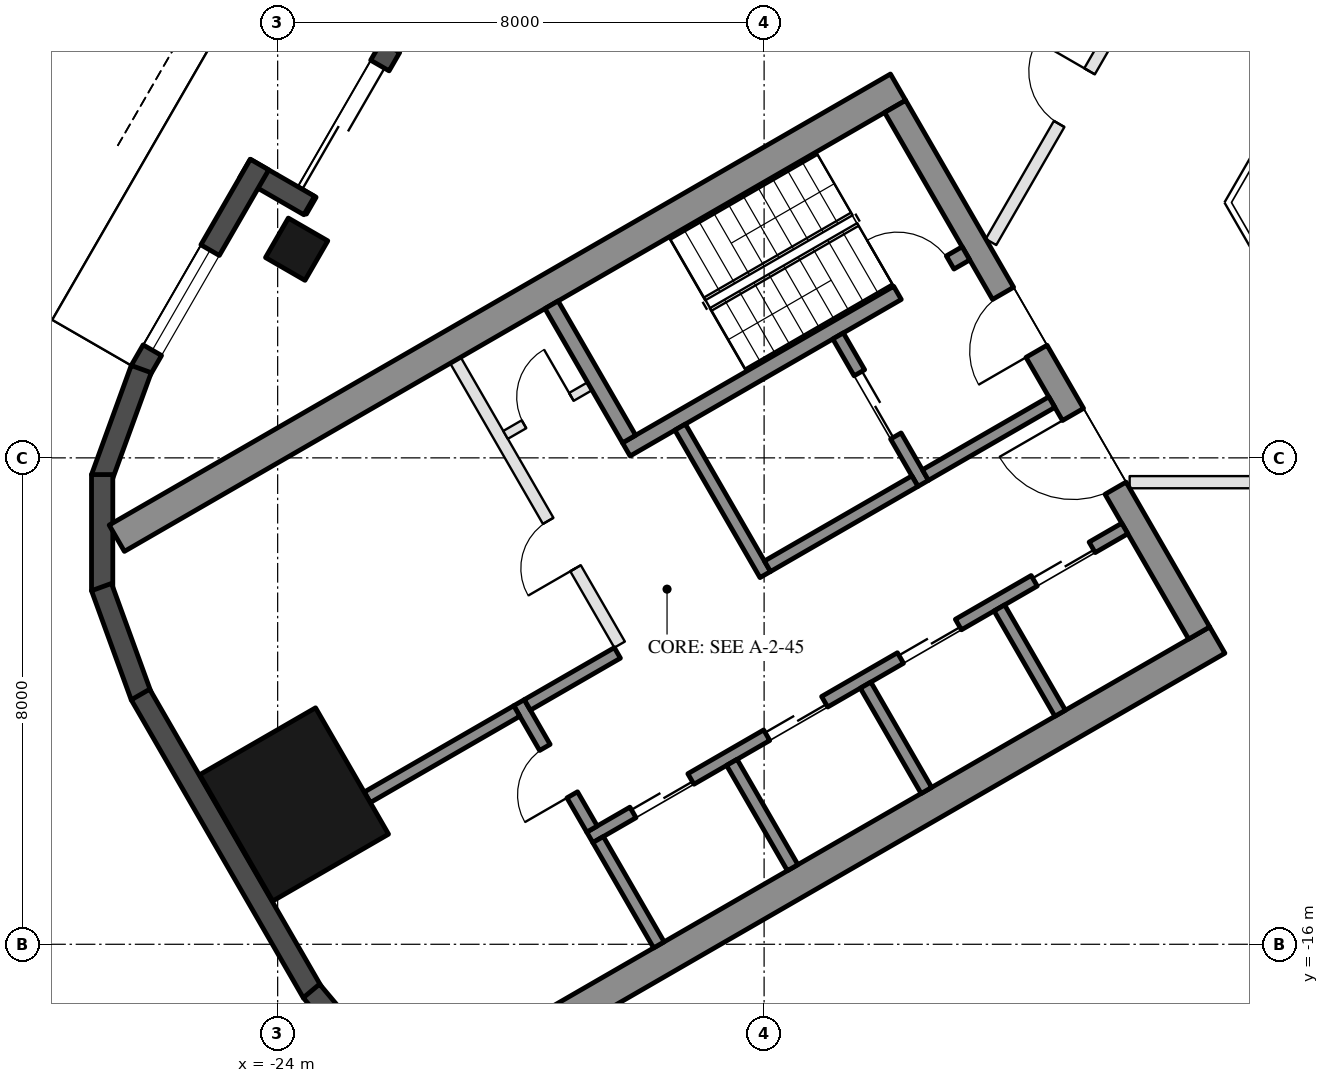
"""IFC4 building model, lengths in metres.
Left out: names, types, materials, properties, quantities, classifications, styles, units other than length and angle.
Written with IfcOpenShell. Run it as: python <this file> out.ifc"""

import sys

from ifc_helpers import new_model, si_unit, direction, frame, frame_2d, origin, origin_2d, place, context, subcontext, project, spatial, rectangle, hollow_rectangle, extrude, element, fill, save


model = new_model("IFC4")
c1 = context("Model", 3, precision=1e-05, world=origin(), true_north=direction((0.0, 1.0)))
c2 = subcontext(c1, "Body", "Model", "MODEL_VIEW")
j1 = project(units=[si_unit("LENGTHUNIT", "METRE"), si_unit("PLANEANGLEUNIT", "RADIAN")], contexts=[c1])
p1 = place(None, origin())
s1 = spatial("IfcSite", under=j1, at=p1, CompositionType="ELEMENT")
p2 = place(p1, origin())
s2 = spatial("IfcBuilding", under=s1, at=p2, CompositionType="ELEMENT")
p3 = place(p2, frame((0.0, 0.0, 198.4)))
s3 = spatial("IfcBuildingStorey", under=s2, at=p3, CompositionType="ELEMENT", Elevation=198.4)
p4 = place(p3, frame((-23.688, -4.568, 0.0), z_axis=(0.0, 0.0, 1.0), x_axis=(0.5, 0.866025403784, 0.0)))
e1 = element("IfcColumn", 1, at=p4, inside=s3, PredefinedType="COLUMN", context=c2, shape_type="SweptSolid", body=[
    extrude(hollow_rectangle(XDim=0.75, YDim=0.75, WallThickness=0.035, at=origin_2d()), origin(), (0.0, 0.0, 1.0), 3.7),
])
p5 = place(p3, frame((-23.729, -13.7, 0.0), z_axis=(0.0, 0.0, 1.0), x_axis=(-0.5, 0.866025403784, 0.0)))
e2 = element("IfcColumn", 2, at=p5, inside=s3, PredefinedType="COLUMN", context=c2, shape_type="SweptSolid", body=[
    extrude(hollow_rectangle(XDim=2.4, YDim=2.2, WallThickness=0.06, at=origin_2d()), origin(), (0.0, 0.0, 1.0), 3.7),
])
p6 = place(p3, frame((-20.309, 1.934, 0.0), z_axis=(0.0, 0.0, 1.0), x_axis=(-0.499992114976, -0.866029956157, 0.0)))
e3 = element("IfcWall", 3, at=p6, inside=s3, PredefinedType="SOLIDWALL", context=c2, shape_type="SweptSolid", body=[
    extrude(rectangle(XDim=6.74, YDim=0.35, at=frame_2d((3.37, 0.0))), origin(), (0.0, 0.0, 1.0), 3.55),
])
p7 = place(p6, frame((4.02, 0.0, 0.0)))
e4 = element("IfcOpeningElement", 4, at=p7, cuts=e3, PredefinedType="OPENING", context=c2, shape_type="SweptSolid", body=[
    extrude(rectangle(XDim=2.4, YDim=2.4, at=frame_2d((1.2, 1.2))), frame((0.0, 0.185, 0.0), z_axis=(0.0, -1.0, 0.0), x_axis=(1.0, 0.0, 0.0)), (0.0, 0.0, 1.0), 0.37),
])
p8 = place(p6, frame((0.77, 0.0, 0.3)))
e5 = element("IfcOpeningElement", 5, at=p8, cuts=e3, PredefinedType="OPENING", context=c2, shape_type="SweptSolid", body=[
    extrude(rectangle(XDim=2.9, YDim=2.65, at=frame_2d((1.45, 1.325))), frame((0.0, 0.185, 0.0), z_axis=(0.0, -1.0, 0.0), x_axis=(1.0, 0.0, 0.0)), (0.0, 0.0, 1.0), 0.37),
])
p9 = place(p3, frame((-23.481, -3.85, 0.0), z_axis=(0.0, 0.0, 1.0), x_axis=(-0.866092288191, 0.499884134912, 0.0)))
e6 = element("IfcWall", 6, at=p9, inside=s3, PredefinedType="SOLIDWALL", context=c2, shape_type="SweptSolid", body=[
    extrude(rectangle(XDim=1.22, YDim=0.35, at=frame_2d((0.61, 0.0))), origin(), (0.0, 0.0, 1.0), 3.55),
])
p10 = place(p3, frame((-24.299, -3.176, 0.0), z_axis=(0.0, 0.0, 1.0), x_axis=(-0.500028278809, -0.866009076391, 0.0)))
e7 = element("IfcWall", 7, at=p10, inside=s3, PredefinedType="SOLIDWALL", context=c2, shape_type="SweptSolid", body=[
    extrude(rectangle(XDim=3.916, YDim=0.35, at=frame_2d((1.958, 0.0))), origin(), (0.0, 0.0, 1.0), 3.55),
])
p11 = place(p10, frame((1.625, 0.0, 0.3)))
e8 = element("IfcOpeningElement", 8, at=p11, cuts=e7, PredefinedType="OPENING", context=c2, shape_type="SweptSolid", body=[
    extrude(rectangle(XDim=1.9, YDim=2.65, at=frame_2d((0.95, 1.325))), frame((0.0, 0.185, 0.0), z_axis=(0.0, -1.0, 0.0), x_axis=(1.0, 0.0, 0.0)), (0.0, 0.0, 1.0), 0.37),
])
for number, where, z_axis, x_axis in (
    (9, (-26.244, -6.54, 0.0), (0.0, 0.0, 1.0), (-0.342, -0.94, 0.0)),
    (10, (-26.886, -8.275, 0.0), (0.0, 0.0, 1.0), (0.0, -1.0, 0.0)),
    (11, (-26.897, -10.125, 0.0), (0.0, 0.0, 1.0), (0.342, -0.94, 0.0)),
):
    element("IfcWall", number, at=place(p3, frame(where, z_axis=z_axis, x_axis=x_axis)), inside=s3, PredefinedType="SOLIDWALL", context=c2, shape_type="SweptSolid", body=[
        extrude(rectangle(XDim=1.91, YDim=0.35, at=frame_2d((0.955, 0.0))), origin(), (0.0, 0.0, 1.0), 3.55),
    ])
p12 = place(p3, frame((-26.257, -11.893, 0.0), z_axis=(0.0, 0.0, 1.0), x_axis=(0.500018773155, -0.866014564827, 0.0)))
e12 = element("IfcWall", 12, at=p12, inside=s3, PredefinedType="SOLIDWALL", context=c2, shape_type="SweptSolid", body=[
    extrude(rectangle(XDim=5.658, YDim=0.35, at=frame_2d((2.829, 0.0))), origin(), (0.0, 0.0, 1.0), 3.55),
])
p13 = place(p3, frame((-23.445, -16.768, 0.0), z_axis=(0.0, 0.0, 1.0), x_axis=(0.642733291068, -0.76609001857, 0.0)))
e13 = element("IfcWall", 13, at=p13, inside=s3, PredefinedType="SOLIDWALL", context=c2, shape_type="SweptSolid", body=[
    extrude(rectangle(XDim=1.91, YDim=0.35, at=frame_2d((0.955, 0.0))), origin(), (0.0, 0.0, 1.0), 3.55),
])
for number, where, z_axis, x_axis in (
    (14, (-13.797, -1.903, 0.0), (0.0, 0.0, 1.0), (-0.866, -0.5, 0.0)),
    (15, (-8.547, -10.997, 0.0), (0.0, 0.0, 1.0), (-0.866, -0.5, 0.0)),
):
    element("IfcWall", number, at=place(p3, frame(where, z_axis=z_axis, x_axis=x_axis)), inside=s3, PredefinedType="SHEAR", context=c2, shape_type="SweptSolid", body=[
        extrude(rectangle(XDim=14.837, YDim=0.5, at=frame_2d((7.418, 0.0))), origin(), (0.0, 0.0, 1.0), 3.5),
    ])
p14 = place(p3, frame((-13.845, -2.22, 0.0), z_axis=(0.0, 0.0, 1.0), x_axis=(0.500004234368, -0.866022959057, 0.0)))
e16 = element("IfcWall", 16, at=p14, inside=s3, PredefinedType="SHEAR", context=c2, shape_type="SweptSolid", body=[
    extrude(rectangle(XDim=10.0, YDim=0.4, at=frame_2d((5.0, 0.0))), origin(), (0.0, 0.0, 1.0), 3.5),
])
p15 = place(p14, frame((3.55, 0.0, 0.0)))
e17 = element("IfcOpeningElement", 17, at=p15, cuts=e16, PredefinedType="OPENING", context=c2, shape_type="SweptSolid", body=[
    extrude(rectangle(XDim=1.1, YDim=2.1, at=frame_2d((0.55, 1.05))), frame((0.0, 0.21, 0.0), z_axis=(0.0, -1.0, 0.0), x_axis=(1.0, 0.0, 0.0)), (0.0, 0.0, 1.0), 0.42),
])
p16 = place(p14, frame((5.85, 0.0, 0.0)))
e18 = element("IfcOpeningElement", 18, at=p16, cuts=e16, PredefinedType="OPENING", context=c2, shape_type="SweptSolid", body=[
    extrude(rectangle(XDim=1.4, YDim=2.1, at=frame_2d((0.7, 1.05))), frame((0.0, 0.21, 0.0), z_axis=(0.0, -1.0, 0.0), x_axis=(1.0, 0.0, 0.0)), (0.0, 0.0, 1.0), 0.42),
])
p17 = place(p3, frame((-12.681, -4.636, 0.0), z_axis=(0.0, 0.0, 1.0), x_axis=(-0.866021702275, -0.500006411147, 0.0)))
e19 = element("IfcWall", 19, at=p17, inside=s3, PredefinedType="SHEAR", context=c2, shape_type="SweptSolid", body=[
    extrude(rectangle(XDim=6.45, YDim=0.25, at=frame_2d((3.225, 0.0))), origin(), (0.0, 0.0, 1.0), 3.5),
])
p18 = place(p17, frame((0.3, 0.0, 0.0)))
e20 = element("IfcOpeningElement", 20, at=p18, cuts=e19, PredefinedType="OPENING", context=c2, shape_type="SweptSolid", body=[
    extrude(rectangle(XDim=1.0, YDim=2.1, at=frame_2d((0.5, 1.05))), frame((0.0, 0.135, 0.0), z_axis=(0.0, -1.0, 0.0), x_axis=(1.0, 0.0, 0.0)), (0.0, 0.0, 1.0), 0.27),
])
p19 = place(p3, frame((-19.496, -5.482, 0.0), z_axis=(0.0, 0.0, 1.0), x_axis=(0.499990435942, -0.866030925526, 0.0)))
e21 = element("IfcWall", 21, at=p19, inside=s3, PredefinedType="SHEAR", context=c2, shape_type="SweptSolid", body=[
    extrude(rectangle(XDim=2.55, YDim=0.25, at=frame_2d((1.275, 0.0))), origin(), (0.0, 0.0, 1.0), 3.5),
])
p20 = place(p3, frame((-17.381, -7.495, 0.0), z_axis=(0.0, 0.0, 1.0), x_axis=(0.500011755427, -0.866018616679, 0.0)))
e22 = element("IfcWall", 22, at=p20, inside=s3, PredefinedType="SHEAR", context=c2, shape_type="SweptSolid", body=[
    extrude(rectangle(XDim=2.8, YDim=0.2, at=frame_2d((1.4, 0.0))), origin(), (0.0, 0.0, 1.0), 3.5),
])
p21 = place(p3, frame((-14.783, -5.995, 0.0), z_axis=(0.0, 0.0, 1.0), x_axis=(0.49994636267, -0.866056369097, 0.0)))
e23 = element("IfcWall", 23, at=p21, inside=s3, PredefinedType="SHEAR", context=c2, shape_type="SweptSolid", body=[
    extrude(rectangle(XDim=2.8, YDim=0.2, at=frame_2d((1.4, 0.0))), origin(), (0.0, 0.0, 1.0), 3.5),
])
p22 = place(p21, frame((0.7, 0.0, 0.0)))
e24 = element("IfcOpeningElement", 24, at=p22, cuts=e23, PredefinedType="OPENING", context=c2, shape_type="SweptSolid", body=[
    extrude(rectangle(XDim=1.2, YDim=2.1, at=frame_2d((0.6, 1.05))), frame((0.0, 0.11, 0.0), z_axis=(0.0, -1.0, 0.0), x_axis=(1.0, 0.0, 0.0)), (0.0, 0.0, 1.0), 0.22),
])
p23 = place(p3, frame((-13.52, -8.383, 0.0), z_axis=(0.0, 0.0, 1.0), x_axis=(-0.866034573852, -0.49998411664, 0.0)))
e25 = element("IfcWall", 25, at=p23, inside=s3, PredefinedType="SHEAR", context=c2, shape_type="SweptSolid", body=[
    extrude(rectangle(XDim=2.8, YDim=0.2, at=frame_2d((1.4, 0.0))), origin(), (0.0, 0.0, 1.0), 3.5),
])
p24 = place(p3, frame((-11.268, -7.083, 0.0), z_axis=(0.0, 0.0, 1.0), x_axis=(-0.866050077142, -0.499957262057, 0.0)))
e26 = element("IfcWall", 26, at=p24, inside=s3, PredefinedType="SHEAR", context=c2, shape_type="SweptSolid", body=[
    extrude(rectangle(XDim=2.4, YDim=0.2, at=frame_2d((1.2, 0.0))), origin(), (0.0, 0.0, 1.0), 3.5),
])
p25 = place(p3, frame((-10.068, -9.162, 0.0), z_axis=(0.0, 0.0, 1.0), x_axis=(-0.866032725843, -0.499987317609, 0.0)))
e27 = element("IfcWall", 27, at=p25, inside=s3, PredefinedType="SHEAR", context=c2, shape_type="SweptSolid", body=[
    extrude(rectangle(XDim=10.16, YDim=0.2, at=frame_2d((5.08, 0.0))), origin(), (0.0, 0.0, 1.0), 3.5),
])
p26 = place(p25, frame((0.62, 0.0, 0.0)))
e28 = element("IfcOpeningElement", 28, at=p26, cuts=e27, PredefinedType="OPENING", context=c2, shape_type="SweptSolid", body=[
    extrude(rectangle(XDim=1.1, YDim=2.1, at=frame_2d((0.55, 1.05))), frame((0.0, 0.11, 0.0), z_axis=(0.0, -1.0, 0.0), x_axis=(1.0, 0.0, 0.0)), (0.0, 0.0, 1.0), 0.22),
])
p27 = place(p25, frame((3.16, 0.0, 0.0)))
e29 = element("IfcOpeningElement", 29, at=p27, cuts=e27, PredefinedType="OPENING", context=c2, shape_type="SweptSolid", body=[
    extrude(rectangle(XDim=1.1, YDim=2.1, at=frame_2d((0.55, 1.05))), frame((0.0, 0.11, 0.0), z_axis=(0.0, -1.0, 0.0), x_axis=(1.0, 0.0, 0.0)), (0.0, 0.0, 1.0), 0.22),
])
p28 = place(p25, frame((5.7, 0.0, 0.0)))
e30 = element("IfcOpeningElement", 30, at=p28, cuts=e27, PredefinedType="OPENING", context=c2, shape_type="SweptSolid", body=[
    extrude(rectangle(XDim=1.1, YDim=2.1, at=frame_2d((0.55, 1.05))), frame((0.0, 0.11, 0.0), z_axis=(0.0, -1.0, 0.0), x_axis=(1.0, 0.0, 0.0)), (0.0, 0.0, 1.0), 0.22),
])
p29 = place(p25, frame((8.24, 0.0, 0.0)))
e31 = element("IfcOpeningElement", 31, at=p29, cuts=e27, PredefinedType="OPENING", context=c2, shape_type="SweptSolid", body=[
    extrude(rectangle(XDim=1.1, YDim=2.1, at=frame_2d((0.55, 1.05))), frame((0.0, 0.11, 0.0), z_axis=(0.0, -1.0, 0.0), x_axis=(1.0, 0.0, 0.0)), (0.0, 0.0, 1.0), 0.22),
])
p30 = place(p3, frame((-20.031, -12.026, 0.0), z_axis=(0.0, 0.0, 1.0), x_axis=(0.500033551112, -0.866006032174, 0.0)))
e32 = element("IfcWall", 32, at=p30, inside=s3, PredefinedType="SHEAR", context=c2, shape_type="SweptSolid", body=[
    extrude(rectangle(XDim=2.4, YDim=0.2, at=frame_2d((1.2, 0.0))), origin(), (0.0, 0.0, 1.0), 3.5),
])
p31 = place(p30, frame((0.85, 0.0, 0.0)))
e33 = element("IfcOpeningElement", 33, at=p31, cuts=e32, PredefinedType="OPENING", context=c2, shape_type="SweptSolid", body=[
    extrude(rectangle(XDim=0.9, YDim=2.1, at=frame_2d((0.45, 1.05))), frame((0.0, 0.11, 0.0), z_axis=(0.0, -1.0, 0.0), x_axis=(1.0, 0.0, 0.0)), (0.0, 0.0, 1.0), 0.22),
])
p32 = place(p3, frame((-18.413, -11.208, 0.0), z_axis=(0.0, 0.0, 1.0), x_axis=(-0.866038183914, -0.499977863513, 0.0)))
e34 = element("IfcWall", 34, at=p32, inside=s3, PredefinedType="SHEAR", context=c2, shape_type="SweptSolid", body=[
    extrude(rectangle(XDim=1.71, YDim=0.2, at=frame_2d((0.855, 0.0))), origin(), (0.0, 0.0, 1.0), 3.5),
])
for number, where, z_axis, x_axis in (
    (35, (-12.131, -10.468, 0.0), (0.0, 0.0, 1.0), (0.5, -0.866, 0.0)),
    (36, (-14.331, -11.738, 0.0), (0.0, 0.0, 1.0), (0.5, -0.866, 0.0)),
    (37, (-16.531, -13.008, 0.0), (0.0, 0.0, 1.0), (0.5, -0.866, 0.0)),
    (38, (-18.73, -14.278, 0.0), (0.0, 0.0, 1.0), (0.5, -0.866, 0.0)),
):
    element("IfcWall", number, at=place(p3, frame(where, z_axis=z_axis, x_axis=x_axis)), inside=s3, PredefinedType="SHEAR", context=c2, shape_type="SweptSolid", body=[
        extrude(rectangle(XDim=2.0, YDim=0.2, at=frame_2d((1.0, 0.0))), origin(), (0.0, 0.0, 1.0), 3.5),
    ])
p33 = place(p3, frame((-20.067, -12.163, 0.0), z_axis=(0.0, 0.0, 1.0), x_axis=(-0.866055327414, -0.49994816717, 0.0)))
e39 = element("IfcWall", 39, at=p33, inside=s3, PredefinedType="SHEAR", context=c2, shape_type="SweptSolid", body=[
    extrude(rectangle(XDim=2.84, YDim=0.2, at=frame_2d((1.42, 0.0))), origin(), (0.0, 0.0, 1.0), 3.5),
])
p34 = place(p3, frame((-21.076, -6.395, 0.0), z_axis=(0.0, 0.0, 1.0), x_axis=(0.50001468107, -0.866016927499, 0.0)))
e40 = element("IfcWall", 40, at=p34, inside=s3, PredefinedType="PARTITIONING", context=c2, shape_type="SweptSolid", body=[
    extrude(rectangle(XDim=5.4, YDim=0.2, at=frame_2d((2.7, 0.0))), origin(), (0.0, 0.0, 1.0), 3.5),
])
p35 = place(p34, frame((3.05, 0.0, 0.0)))
e41 = element("IfcOpeningElement", 41, at=p35, cuts=e40, PredefinedType="OPENING", context=c2, shape_type="SweptSolid", body=[
    extrude(rectangle(XDim=0.9, YDim=2.1, at=frame_2d((0.45, 1.05))), frame((0.0, 0.11, 0.0), z_axis=(0.0, -1.0, 0.0), x_axis=(1.0, 0.0, 0.0)), (0.0, 0.0, 1.0), 0.22),
])
p36 = place(p3, frame((-18.866, -6.822, 0.0), z_axis=(0.0, 0.0, 1.0), x_axis=(-0.866028054938, -0.499995408039, 0.0)))
e42 = element("IfcWall", 42, at=p36, inside=s3, PredefinedType="PARTITIONING", context=c2, shape_type="SweptSolid", body=[
    extrude(rectangle(XDim=1.6, YDim=0.15, at=frame_2d((0.8, 0.0))), origin(), (0.0, 0.0, 1.0), 3.5),
])
p37 = place(p36, frame((0.35, 0.0, 0.0)))
e43 = element("IfcOpeningElement", 43, at=p37, cuts=e42, PredefinedType="OPENING", context=c2, shape_type="SweptSolid", body=[
    extrude(rectangle(XDim=0.9, YDim=2.1, at=frame_2d((0.45, 1.05))), frame((0.0, 0.085, 0.0), z_axis=(0.0, -1.0, 0.0), x_axis=(1.0, 0.0, 0.0)), (0.0, 0.0, 1.0), 0.17),
])
p38 = place(p3, frame((-1.302, -8.4, 0.0), z_axis=(0.0, 0.0, 1.0), x_axis=(-1.0, 0.0, 0.0)))
e44 = element("IfcWall", 44, at=p38, inside=s3, PredefinedType="PARTITIONING", context=c2, shape_type="SweptSolid", body=[
    extrude(rectangle(XDim=8.686, YDim=0.2, at=frame_2d((4.343, 0.0))), origin(), (0.0, 0.0, 1.0), 2.95),
])
p39 = place(p38, frame((3.843, 0.0, 0.0)))
e45 = element("IfcOpeningElement", 45, at=p39, cuts=e44, PredefinedType="OPENING", context=c2, shape_type="SweptSolid", body=[
    extrude(rectangle(XDim=1.0, YDim=2.1, at=frame_2d((0.5, 1.05))), frame((0.0, 0.11, 0.0), z_axis=(0.0, -1.0, 0.0), x_axis=(1.0, 0.0, 0.0)), (0.0, 0.0, 1.0), 0.22),
])
p40 = place(p3, frame((-12.269, -4.45, 0.0), z_axis=(0.0, 0.0, 1.0), x_axis=(0.500026884667, 0.866009881359, 0.0)))
e46 = element("IfcWall", 46, at=p40, inside=s3, PredefinedType="PARTITIONING", context=c2, shape_type="SweptSolid", body=[
    extrude(rectangle(XDim=5.484, YDim=0.2, at=frame_2d((2.742, 0.0))), origin(), (0.0, 0.0, 1.0), 2.95),
])
p41 = place(p40, frame((2.242, 0.0, 0.0)))
e47 = element("IfcOpeningElement", 47, at=p41, cuts=e46, PredefinedType="OPENING", context=c2, shape_type="SweptSolid", body=[
    extrude(rectangle(XDim=1.0, YDim=2.1, at=frame_2d((0.5, 1.05))), frame((0.0, 0.11, 0.0), z_axis=(0.0, -1.0, 0.0), x_axis=(1.0, 0.0, 0.0)), (0.0, 0.0, 1.0), 0.22),
])
p42 = place(p7, frame((2.4, 0.0, 0.0), z_axis=(0.0, 0.0, 1.0), x_axis=(-1.0, 0.0, 0.0)))
e48 = element("IfcDoor", 48, at=p42, inside=s3, OperationType="SLIDING_TO_LEFT", PredefinedType="DOOR", context=c2, shape_type="SweptSolid", body=[
    extrude(rectangle(XDim=2.4, YDim=2.4, at=frame_2d((1.2, 1.2))), frame((0.0, 0.025, 0.0), z_axis=(0.0, -1.0, 0.0), x_axis=(1.0, 0.0, 0.0)), (0.0, 0.0, 1.0), 0.05),
])
fill(e4, e48)
p43 = place(p11, origin())
e49 = element("IfcWindow", 49, at=p43, inside=s3, PartitioningType="SINGLE_PANEL", PredefinedType="WINDOW", context=c2, shape_type="SweptSolid", body=[
    extrude(rectangle(XDim=1.9, YDim=2.65, at=frame_2d((0.95, 1.325))), frame((0.0, 0.03, 0.0), z_axis=(0.0, -1.0, 0.0), x_axis=(1.0, 0.0, 0.0)), (0.0, 0.0, 1.0), 0.06),
])
fill(e8, e49)
p44 = place(p22, origin())
e50 = element("IfcDoor", 50, at=p44, inside=s3, OperationType="DOUBLE_DOOR_SLIDING", PredefinedType="DOOR", context=c2, shape_type="SweptSolid", body=[
    extrude(rectangle(XDim=1.2, YDim=2.1, at=frame_2d((0.6, 1.05))), frame((0.0, 0.025, 0.0), z_axis=(0.0, -1.0, 0.0), x_axis=(1.0, 0.0, 0.0)), (0.0, 0.0, 1.0), 0.05),
])
fill(e24, e50)
p45 = place(p37, frame((0.9, 0.0, 0.0), z_axis=(0.0, 0.0, 1.0), x_axis=(-1.0, 0.0, 0.0)))
e51 = element("IfcDoor", 51, at=p45, inside=s3, OperationType="SINGLE_SWING_RIGHT", PredefinedType="DOOR", context=c2, shape_type="SweptSolid", body=[
    extrude(rectangle(XDim=0.9, YDim=2.1, at=frame_2d((0.45, 1.05))), frame((0.0, 0.025, 0.0), z_axis=(0.0, -1.0, 0.0), x_axis=(1.0, 0.0, 0.0)), (0.0, 0.0, 1.0), 0.05),
])
fill(e43, e51)
p46 = place(p26, origin())
e52 = element("IfcDoor", 52, at=p46, inside=s3, OperationType="DOUBLE_DOOR_SLIDING", PredefinedType="DOOR", context=c2, shape_type="SweptSolid", body=[
    extrude(rectangle(XDim=1.1, YDim=2.1, at=frame_2d((0.55, 1.05))), frame((0.0, 0.025, 0.0), z_axis=(0.0, -1.0, 0.0), x_axis=(1.0, 0.0, 0.0)), (0.0, 0.0, 1.0), 0.05),
])
fill(e28, e52)
p47 = place(p27, origin())
e53 = element("IfcDoor", 53, at=p47, inside=s3, OperationType="DOUBLE_DOOR_SLIDING", PredefinedType="DOOR", context=c2, shape_type="SweptSolid", body=[
    extrude(rectangle(XDim=1.1, YDim=2.1, at=frame_2d((0.55, 1.05))), frame((0.0, 0.025, 0.0), z_axis=(0.0, -1.0, 0.0), x_axis=(1.0, 0.0, 0.0)), (0.0, 0.0, 1.0), 0.05),
])
fill(e29, e53)
p48 = place(p28, origin())
e54 = element("IfcDoor", 54, at=p48, inside=s3, OperationType="DOUBLE_DOOR_SLIDING", PredefinedType="DOOR", context=c2, shape_type="SweptSolid", body=[
    extrude(rectangle(XDim=1.1, YDim=2.1, at=frame_2d((0.55, 1.05))), frame((0.0, 0.025, 0.0), z_axis=(0.0, -1.0, 0.0), x_axis=(1.0, 0.0, 0.0)), (0.0, 0.0, 1.0), 0.05),
])
fill(e30, e54)
p49 = place(p29, origin())
e55 = element("IfcDoor", 55, at=p49, inside=s3, OperationType="DOUBLE_DOOR_SLIDING", PredefinedType="DOOR", context=c2, shape_type="SweptSolid", body=[
    extrude(rectangle(XDim=1.1, YDim=2.1, at=frame_2d((0.55, 1.05))), frame((0.0, 0.025, 0.0), z_axis=(0.0, -1.0, 0.0), x_axis=(1.0, 0.0, 0.0)), (0.0, 0.0, 1.0), 0.05),
])
fill(e31, e55)
p50 = place(p31, frame((0.9, 0.0, 0.0), z_axis=(0.0, 0.0, 1.0), x_axis=(-1.0, 0.0, 0.0)))
e56 = element("IfcDoor", 56, at=p50, inside=s3, OperationType="SINGLE_SWING_LEFT", PredefinedType="DOOR", context=c2, shape_type="SweptSolid", body=[
    extrude(rectangle(XDim=0.9, YDim=2.1, at=frame_2d((0.45, 1.05))), frame((0.0, 0.025, 0.0), z_axis=(0.0, -1.0, 0.0), x_axis=(1.0, 0.0, 0.0)), (0.0, 0.0, 1.0), 0.05),
])
fill(e33, e56)
p51 = place(p35, frame((0.9, 0.0, 0.0), z_axis=(0.0, 0.0, 1.0), x_axis=(-1.0, 0.0, 0.0)))
e57 = element("IfcDoor", 57, at=p51, inside=s3, OperationType="SINGLE_SWING_LEFT", PredefinedType="DOOR", context=c2, shape_type="SweptSolid", body=[
    extrude(rectangle(XDim=0.9, YDim=2.1, at=frame_2d((0.45, 1.05))), frame((0.0, 0.025, 0.0), z_axis=(0.0, -1.0, 0.0), x_axis=(1.0, 0.0, 0.0)), (0.0, 0.0, 1.0), 0.05),
])
fill(e41, e57)
p52 = place(p15, frame((1.1, 0.0, 0.0), z_axis=(0.0, 0.0, 1.0), x_axis=(-1.0, 0.0, 0.0)))
e58 = element("IfcDoor", 58, at=p52, inside=s3, OperationType="SINGLE_SWING_LEFT", PredefinedType="DOOR", context=c2, shape_type="SweptSolid", body=[
    extrude(rectangle(XDim=1.1, YDim=2.1, at=frame_2d((0.55, 1.05))), frame((0.0, 0.025, 0.0), z_axis=(0.0, -1.0, 0.0), x_axis=(1.0, 0.0, 0.0)), (0.0, 0.0, 1.0), 0.05),
])
fill(e17, e58)
p53 = place(p16, frame((1.4, 0.0, 0.0), z_axis=(0.0, 0.0, 1.0), x_axis=(-1.0, 0.0, 0.0)))
e59 = element("IfcDoor", 59, at=p53, inside=s3, OperationType="DOUBLE_DOOR_SINGLE_SWING", PredefinedType="DOOR", context=c2, shape_type="SweptSolid", body=[
    extrude(rectangle(XDim=1.4, YDim=2.1, at=frame_2d((0.7, 1.05))), frame((0.0, 0.025, 0.0), z_axis=(0.0, -1.0, 0.0), x_axis=(1.0, 0.0, 0.0)), (0.0, 0.0, 1.0), 0.05),
])
fill(e18, e59)
p54 = place(p18, frame((1.0, 0.0, 0.0), z_axis=(0.0, 0.0, 1.0), x_axis=(-1.0, 0.0, 0.0)))
e60 = element("IfcDoor", 60, at=p54, inside=s3, OperationType="SINGLE_SWING_LEFT", PredefinedType="DOOR", context=c2, shape_type="SweptSolid", body=[
    extrude(rectangle(XDim=1.0, YDim=2.1, at=frame_2d((0.5, 1.05))), frame((0.0, 0.025, 0.0), z_axis=(0.0, -1.0, 0.0), x_axis=(1.0, 0.0, 0.0)), (0.0, 0.0, 1.0), 0.05),
])
fill(e20, e60)
p55 = place(p41, origin())
e61 = element("IfcDoor", 61, at=p55, inside=s3, OperationType="SINGLE_SWING_RIGHT", PredefinedType="DOOR", context=c2, shape_type="SweptSolid", body=[
    extrude(rectangle(XDim=1.0, YDim=2.1, at=frame_2d((0.5, 1.05))), frame((0.0, 0.025, 0.0), z_axis=(0.0, -1.0, 0.0), x_axis=(1.0, 0.0, 0.0)), (0.0, 0.0, 1.0), 0.05),
])
fill(e47, e61)
save(model, sys.argv[1])
